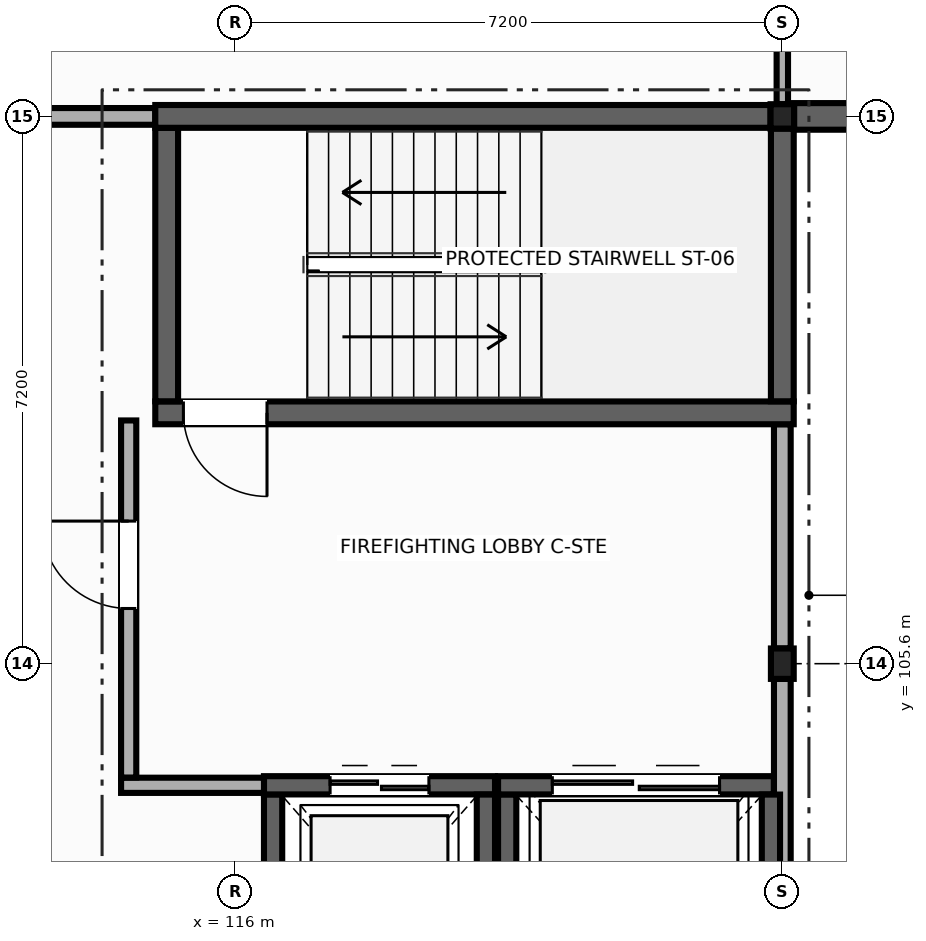
"""IFC4 building model, lengths in metres.
Left out: names, types, materials, properties, quantities, classifications, styles, units other than length and angle.
Written with IfcOpenShell. Run it as: python <this file> out.ifc"""

import sys

from ifc_helpers import new_model, si_unit, direction, frame, frame_2d, origin, origin_2d, place, context, subcontext, project, spatial, rectangle, i_section, extrude, element, fill, save


model = new_model("IFC4")
c1 = context("Model", 3, precision=1e-05, world=origin(), true_north=direction((0.0, 1.0)))
c2 = subcontext(c1, "Body", "Model", "MODEL_VIEW")
j1 = project(units=[si_unit("LENGTHUNIT", "METRE"), si_unit("PLANEANGLEUNIT", "RADIAN")], contexts=[c1])
p1 = place(None, origin())
s1 = spatial("IfcSite", under=j1, at=p1, CompositionType="ELEMENT")
p2 = place(p1, origin())
s2 = spatial("IfcBuilding", under=s1, at=p2, CompositionType="ELEMENT")
p3 = place(p2, frame((0.0, 0.0, 18.9)))
s3 = spatial("IfcBuildingStorey", under=s2, at=p3, CompositionType="ELEMENT", Elevation=18.9)
p4 = place(p3, frame((123.2, 105.6, 0.0), z_axis=(0.0, 0.0, 1.0), x_axis=(1.0, 0.0, 0.0)))
e1 = element("IfcColumn", 1, at=p4, inside=s3, PredefinedType="COLUMN", context=c2, shape_type="SweptSolid", body=[
    extrude(i_section(OverallWidth=0.3, OverallDepth=0.4, WebThickness=0.013, FlangeThickness=0.024, at=origin_2d()), origin(), (0.0, 0.0, 1.0), 4.2),
])
p5 = place(p3, frame((123.2, 112.8, 0.0), z_axis=(0.0, 0.0, 1.0), x_axis=(1.0, 0.0, 0.0)))
e2 = element("IfcColumn", 2, at=p5, inside=s3, PredefinedType="COLUMN", context=c2, shape_type="SweptSolid", body=[
    extrude(i_section(OverallWidth=0.309, OverallDepth=0.321, WebThickness=0.014, FlangeThickness=0.022, at=origin_2d()), origin(), (0.0, 0.0, 1.0), 4.2),
])
p6 = place(p3, frame((109.0, 112.8, 0.0), z_axis=(0.0, 0.0, 1.0), x_axis=(1.0, 0.0, 0.0)))
e3 = element("IfcWall", 3, at=p6, inside=s3, PredefinedType="SOLIDWALL", context=c2, shape_type="SweptSolid", body=[
    extrude(rectangle(XDim=5.95, YDim=0.22, at=frame_2d((2.975, 0.0))), origin(), (0.0, 0.0, 1.0), 3.95),
])
p7 = place(p6, frame((2.425, 0.0, 0.0)))
e4 = element("IfcOpeningElement", 4, at=p7, cuts=e3, PredefinedType="OPENING", context=c2, shape_type="SweptSolid", body=[
    extrude(rectangle(XDim=1.1, YDim=2.15, at=frame_2d((0.55, 1.075))), frame((0.0, 0.12, 0.0), z_axis=(0.0, -1.0, 0.0), x_axis=(1.0, 0.0, 0.0)), (0.0, 0.0, 1.0), 0.24),
])
p8 = place(p3, frame((123.2, 108.75, 0.0), z_axis=(0.0, 0.0, 1.0), x_axis=(0.0, -1.0, 0.0)))
e5 = element("IfcWall", 5, at=p8, inside=s3, PredefinedType="SOLIDWALL", context=c2, shape_type="SweptSolid", body=[
    extrude(rectangle(XDim=2.95, YDim=0.22, at=frame_2d((1.475, 0.0))), origin(), (0.0, 0.0, 1.0), 3.245),
])
p9 = place(p3, frame((123.2, 105.4, 0.0), z_axis=(0.0, 0.0, 1.0), x_axis=(0.0, -1.0, 0.0)))
e6 = element("IfcWall", 6, at=p9, inside=s3, PredefinedType="SOLIDWALL", context=c2, shape_type="SweptSolid", body=[
    extrude(rectangle(XDim=6.85, YDim=0.22, at=frame_2d((3.425, 0.0))), origin(), (0.0, 0.0, 1.0), 3.275),
])
p10 = place(p3, frame((130.1, 112.8, 0.0), z_axis=(0.0, 0.0, 1.0), x_axis=(-1.0, 0.0, 0.0)))
e7 = element("IfcWall", 7, at=p10, inside=s3, PredefinedType="SOLIDWALL", context=c2, shape_type="SweptSolid", body=[
    extrude(rectangle(XDim=6.746, YDim=0.35, at=frame_2d((3.373, 0.0))), origin(), (0.0, 0.0, 1.0), 3.95),
])
p11 = place(p10, frame((2.573, 0.0, 0.9)))
e8 = element("IfcOpeningElement", 8, at=p11, cuts=e7, PredefinedType="OPENING", context=c2, shape_type="SweptSolid", body=[
    extrude(rectangle(XDim=1.6, YDim=2.4, at=frame_2d((0.8, 1.2))), frame((0.0, 0.185, 0.0), z_axis=(0.0, -1.0, 0.0), x_axis=(1.0, 0.0, 0.0)), (0.0, 0.0, 1.0), 0.37),
])
p12 = place(p3, frame((123.35, 108.9, 0.0), z_axis=(0.0, 0.0, 1.0), x_axis=(-1.0, 0.0, 0.0)))
e9 = element("IfcWall", 9, at=p12, inside=s3, PredefinedType="SHEAR", context=c2, shape_type="SweptSolid", body=[
    extrude(rectangle(XDim=8.4, YDim=0.3, at=frame_2d((4.2, 0.0))), origin(), (0.0, 0.0, 1.0), 3.98),
])
p13 = place(p12, frame((6.93, 0.0, 0.0)))
e10 = element("IfcOpeningElement", 10, at=p13, cuts=e9, PredefinedType="OPENING", context=c2, shape_type="SweptSolid", body=[
    extrude(rectangle(XDim=1.1, YDim=2.15, at=frame_2d((0.55, 1.075))), frame((0.0, 0.16, 0.0), z_axis=(0.0, -1.0, 0.0), x_axis=(1.0, 0.0, 0.0)), (0.0, 0.0, 1.0), 0.32),
])
p14 = place(p3, frame((115.1, 109.052, 0.0), z_axis=(0.0, 0.0, 1.0), x_axis=(0.0, 1.0, 0.0)))
e11 = element("IfcWall", 11, at=p14, inside=s3, PredefinedType="SHEAR", context=c2, shape_type="SweptSolid", body=[
    extrude(rectangle(XDim=3.598, YDim=0.3, at=frame_2d((1.799, 0.0))), origin(), (0.0, 0.0, 1.0), 3.98),
])
p15 = place(p3, frame((114.95, 112.8, 0.0), z_axis=(0.0, 0.0, 1.0), x_axis=(1.0, 0.0, 0.0)))
e12 = element("IfcWall", 12, at=p15, inside=s3, PredefinedType="SHEAR", context=c2, shape_type="SweptSolid", body=[
    extrude(rectangle(XDim=8.095, YDim=0.3, at=frame_2d((4.048, 0.0))), origin(), (0.0, 0.0, 1.0), 3.95),
])
p16 = place(p3, frame((123.2, 112.64, 0.0), z_axis=(0.0, 0.0, 1.0), x_axis=(0.0, -1.0, 0.0)))
e13 = element("IfcWall", 13, at=p16, inside=s3, PredefinedType="SHEAR", context=c2, shape_type="SweptSolid", body=[
    extrude(rectangle(XDim=3.588, YDim=0.3, at=frame_2d((1.794, 0.0))), origin(), (0.0, 0.0, 1.0), 3.98),
])
p17 = place(p3, frame((116.5, 100.922, 0.0), z_axis=(0.0, 0.0, 1.0), x_axis=(0.0, 1.0, 0.0)))
e14 = element("IfcWall", 14, at=p17, inside=s3, PredefinedType="SHEAR", context=c2, shape_type="SweptSolid", body=[
    extrude(rectangle(XDim=2.958, YDim=0.24, at=frame_2d((1.479, 0.0))), origin(), (0.0, 0.0, 1.0), 3.98),
])
p18 = place(p3, frame((116.38, 104.0, 0.0), z_axis=(0.0, 0.0, 1.0), x_axis=(1.0, 0.0, 0.0)))
e15 = element("IfcWall", 15, at=p18, inside=s3, PredefinedType="SHEAR", context=c2, shape_type="SweptSolid", body=[
    extrude(rectangle(XDim=3.04, YDim=0.24, at=frame_2d((1.52, 0.0))), origin(), (0.0, 0.0, 1.0), 3.98),
])
p19 = place(p18, frame((0.87, 0.0, 0.0)))
e16 = element("IfcOpeningElement", 16, at=p19, cuts=e15, PredefinedType="OPENING", context=c2, shape_type="SweptSolid", body=[
    extrude(rectangle(XDim=1.3, YDim=2.15, at=frame_2d((0.65, 1.075))), frame((0.0, 0.13, 0.0), z_axis=(0.0, -1.0, 0.0), x_axis=(1.0, 0.0, 0.0)), (0.0, 0.0, 1.0), 0.26),
])
p20 = place(p3, frame((119.3, 103.878, 0.0), z_axis=(0.0, 0.0, 1.0), x_axis=(0.0, -1.0, 0.0)))
e17 = element("IfcWall", 17, at=p20, inside=s3, PredefinedType="SHEAR", context=c2, shape_type="SweptSolid", body=[
    extrude(rectangle(XDim=2.956, YDim=0.24, at=frame_2d((1.478, 0.0))), origin(), (0.0, 0.0, 1.0), 3.98),
])
p21 = place(p3, frame((119.58, 100.322, 0.0), z_axis=(0.0, 0.0, 1.0), x_axis=(0.0, 1.0, 0.0)))
e18 = element("IfcWall", 18, at=p21, inside=s3, PredefinedType="SHEAR", context=c2, shape_type="SweptSolid", body=[
    extrude(rectangle(XDim=3.558, YDim=0.24, at=frame_2d((1.779, 0.0))), origin(), (0.0, 0.0, 1.0), 3.98),
])
p22 = place(p3, frame((119.46, 104.0, 0.0), z_axis=(0.0, 0.0, 1.0), x_axis=(1.0, 0.0, 0.0)))
e19 = element("IfcWall", 19, at=p22, inside=s3, PredefinedType="SHEAR", context=c2, shape_type="SweptSolid", body=[
    extrude(rectangle(XDim=3.628, YDim=0.24, at=frame_2d((1.814, 0.0))), origin(), (0.0, 0.0, 1.0), 3.98),
])
p23 = place(p22, frame((0.714, 0.0, 0.0)))
e20 = element("IfcOpeningElement", 20, at=p23, cuts=e19, PredefinedType="OPENING", context=c2, shape_type="SweptSolid", body=[
    extrude(rectangle(XDim=2.2, YDim=2.5, at=frame_2d((1.1, 1.25))), frame((0.0, 0.13, 0.0), z_axis=(0.0, -1.0, 0.0), x_axis=(1.0, 0.0, 0.0)), (0.0, 0.0, 1.0), 0.26),
])
p24 = place(p3, frame((123.05, 103.878, 0.0), z_axis=(0.0, 0.0, 1.0), x_axis=(0.0, -1.0, 0.0)))
e21 = element("IfcWall", 21, at=p24, inside=s3, PredefinedType="SHEAR", context=c2, shape_type="SweptSolid", body=[
    extrude(rectangle(XDim=3.556, YDim=0.24, at=frame_2d((1.778, 0.0))), origin(), (0.0, 0.0, 1.0), 3.98),
])
p25 = place(p3, frame((116.38, 104.0, 0.0), z_axis=(0.0, 0.0, 1.0), x_axis=(-1.0, 0.0, 0.0)))
e22 = element("IfcWall", 22, at=p25, inside=s3, PredefinedType="PARTITIONING", context=c2, shape_type="SweptSolid", body=[
    extrude(rectangle(XDim=1.88, YDim=0.2, at=frame_2d((0.94, 0.0))), origin(), (0.0, 0.0, 1.0), 3.98),
])
p26 = place(p3, frame((114.6, 104.102, 0.0), z_axis=(0.0, 0.0, 1.0), x_axis=(0.0, 1.0, 0.0)))
e23 = element("IfcWall", 23, at=p26, inside=s3, PredefinedType="PARTITIONING", context=c2, shape_type="SweptSolid", body=[
    extrude(rectangle(XDim=4.698, YDim=0.2, at=frame_2d((2.349, 0.0))), origin(), (0.0, 0.0, 1.0), 3.98),
])
p27 = place(p26, frame((2.224, 0.0, 0.0)))
e24 = element("IfcOpeningElement", 24, at=p27, cuts=e23, PredefinedType="OPENING", context=c2, shape_type="SweptSolid", body=[
    extrude(rectangle(XDim=1.15, YDim=2.15, at=frame_2d((0.575, 1.075))), frame((0.0, 0.11, 0.0), z_axis=(0.0, -1.0, 0.0), x_axis=(1.0, 0.0, 0.0)), (0.0, 0.0, 1.0), 0.22),
])
p28 = place(p3, frame((123.2, 119.7, 0.0), z_axis=(0.0, 0.0, 1.0), x_axis=(0.0, -1.0, 0.0)))
e25 = element("IfcWall", 25, at=p28, inside=s3, PredefinedType="PARTITIONING", context=c2, shape_type="SweptSolid", body=[
    extrude(rectangle(XDim=6.74, YDim=0.15, at=frame_2d((3.37, 0.0))), origin(), (0.0, 0.0, 1.0), 3.245),
])
p29 = place(p13, origin())
e26 = element("IfcDoor", 26, at=p29, inside=s3, OperationType="SINGLE_SWING_LEFT", PredefinedType="DOOR", context=c2, shape_type="SweptSolid", body=[
    extrude(rectangle(XDim=1.1, YDim=2.15, at=frame_2d((0.55, 1.075))), frame((0.0, 0.025, 0.0), z_axis=(0.0, -1.0, 0.0), x_axis=(1.0, 0.0, 0.0)), (0.0, 0.0, 1.0), 0.05),
])
fill(e10, e26)
p30 = place(p19, origin())
e27 = element("IfcDoor", 27, at=p30, inside=s3, OperationType="DOUBLE_DOOR_SLIDING", PredefinedType="DOOR", context=c2, shape_type="SweptSolid", body=[
    extrude(rectangle(XDim=1.3, YDim=2.15, at=frame_2d((0.65, 1.075))), frame((0.0, 0.025, 0.0), z_axis=(0.0, -1.0, 0.0), x_axis=(1.0, 0.0, 0.0)), (0.0, 0.0, 1.0), 0.05),
])
fill(e16, e27)
p31 = place(p23, origin())
e28 = element("IfcDoor", 28, at=p31, inside=s3, OperationType="DOUBLE_DOOR_SLIDING", PredefinedType="DOOR", context=c2, shape_type="SweptSolid", body=[
    extrude(rectangle(XDim=2.2, YDim=2.5, at=frame_2d((1.1, 1.25))), frame((0.0, 0.025, 0.0), z_axis=(0.0, -1.0, 0.0), x_axis=(1.0, 0.0, 0.0)), (0.0, 0.0, 1.0), 0.05),
])
fill(e20, e28)
p32 = place(p27, origin())
e29 = element("IfcDoor", 29, at=p32, inside=s3, OperationType="SINGLE_SWING_RIGHT", PredefinedType="DOOR", context=c2, shape_type="SweptSolid", body=[
    extrude(rectangle(XDim=1.15, YDim=2.15, at=frame_2d((0.575, 1.075))), frame((0.0, 0.025, 0.0), z_axis=(0.0, -1.0, 0.0), x_axis=(1.0, 0.0, 0.0)), (0.0, 0.0, 1.0), 0.05),
])
fill(e24, e29)
save(model, sys.argv[1])
